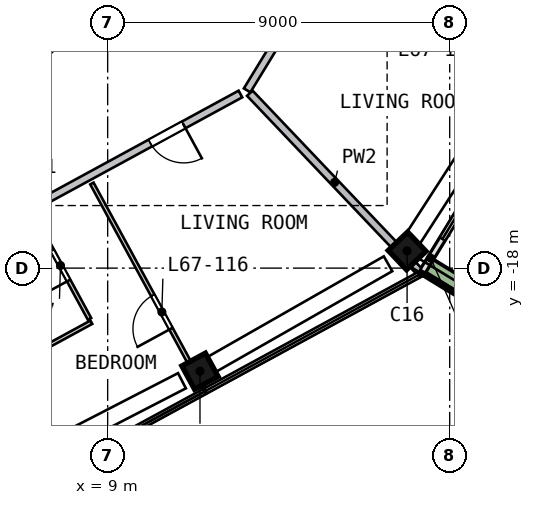
"""IFC4 building model, lengths in metres.
Left out: names, types, materials, properties, quantities, classifications, styles, units other than length and angle.
Written with IfcOpenShell. Run it as: python <this file> out.ifc"""

import sys

from ifc_helpers import new_model, si_unit, direction, frame, frame_2d, origin, origin_2d, place, context, subcontext, project, spatial, rectangle, extrude, element, fill, save


model = new_model("IFC4")
c1 = context("Model", 3, precision=1e-05, world=origin(), true_north=direction((0.0, 1.0)))
c2 = subcontext(c1, "Body", "Model", "MODEL_VIEW")
j1 = project(units=[si_unit("LENGTHUNIT", "METRE"), si_unit("PLANEANGLEUNIT", "RADIAN")], contexts=[c1])
p1 = place(None, origin())
s1 = spatial("IfcSite", under=j1, at=p1, CompositionType="ELEMENT")
p2 = place(p1, origin())
s2 = spatial("IfcBuilding", under=s1, at=p2, CompositionType="ELEMENT")
p3 = place(p2, frame((0.0, 0.0, 274.0)))
s3 = spatial("IfcBuildingStorey", under=s2, at=p3, CompositionType="ELEMENT", Elevation=274.0)
p4 = place(p3, frame((11.311, -20.78, 0.0), z_axis=(0.0984061, 0.054678505, 0.993643045), x_axis=(0.872632983, 0.475225292, -0.112572636)))
e1 = element("IfcColumn", 1, at=p4, inside=s3, PredefinedType="COLUMN", context=c2, shape_type="SweptSolid", body=[
    extrude(rectangle(XDim=0.7, YDim=0.7, at=origin_2d()), origin(), (0.0, 0.0, 1.0), 3.21),
])
p5 = place(p3, frame((16.779, -17.644, 0.0), z_axis=(0.083241987, 0.080429245, 0.993278364), x_axis=(-0.720153088, -0.684092384, 0.115746011)))
e2 = element("IfcColumn", 2, at=p5, inside=s3, PredefinedType="COLUMN", context=c2, shape_type="SweptSolid", body=[
    extrude(rectangle(XDim=0.7, YDim=0.7, at=origin_2d()), origin(), (0.0, 0.0, 1.0), 3.211),
])
p6 = place(p3, frame((5.64, -13.841, 0.0), z_axis=(0.0, 0.0, 1.0), x_axis=(0.707106781, 0.707106781, 0.0)))
e3 = element("IfcWall", 3, at=p6, inside=s3, PredefinedType="SHEAR", context=c2, shape_type="SweptSolid", body=[
    extrude(rectangle(XDim=11.598, YDim=0.45, at=frame_2d((5.799, 0.0))), origin(), (0.0, 0.0, 1.0), 3.5),
])
p7 = place(p6, frame((2.099, 0.0, 0.0)))
e4 = element("IfcOpeningElement", 4, at=p7, cuts=e3, PredefinedType="OPENING", context=c2, shape_type="SweptSolid", body=[
    extrude(rectangle(XDim=1.2, YDim=2.1, at=frame_2d((0.6, 1.05))), frame((0.0, 0.235, 0.0), z_axis=(0.0, -1.0, 0.0), x_axis=(1.0, 0.0, 0.0)), (0.0, 0.0, 1.0), 0.47),
])
p8 = place(p3, frame((17.295, -18.074, 0.0), z_axis=(0.0, 0.0, 1.0), x_axis=(0.521598655, 0.853190977, 0.0)))
e5 = element("IfcWall", 5, at=p8, inside=s3, PredefinedType="SOLIDWALL", context=c2, shape_type="SweptSolid", body=[
    extrude(rectangle(XDim=3.787, YDim=0.15, at=frame_2d((1.893, 0.0))), origin(), (0.0, 0.0, 1.0), 2.525),
])
p9 = place(p8, frame((0.987, 0.0, 0.0)))
e6 = element("IfcOpeningElement", 6, at=p9, cuts=e5, PredefinedType="OPENING", context=c2, shape_type="SweptSolid", body=[
    extrude(rectangle(XDim=2.4, YDim=2.4, at=frame_2d((1.2, 1.2))), frame((0.0, 0.085, 0.0), z_axis=(0.0, -1.0, 0.0), x_axis=(1.0, 0.0, 0.0)), (0.0, 0.0, 1.0), 0.17),
])
p10 = place(p3, frame((17.438, -17.986, 0.0), z_axis=(0.0, 0.0, 1.0), x_axis=(0.853200699, -0.521582752, 0.0)))
e7 = element("IfcWall", 7, at=p10, inside=s3, PredefinedType="SOLIDWALL", context=c2, shape_type="SweptSolid", body=[
    extrude(rectangle(XDim=3.199, YDim=0.5, at=frame_2d((1.599, 0.0))), origin(), (0.0, 0.0, 1.0), 0.7),
])
p11 = place(p3, frame((12.493, -13.418, 0.0), z_axis=(0.0, 0.0, 1.0), x_axis=(-0.878320972, -0.478071407, 0.0)))
e8 = element("IfcWall", 8, at=p11, inside=s3, PredefinedType="SOLIDWALL", context=c2, shape_type="SweptSolid", body=[
    extrude(rectangle(XDim=9.117, YDim=0.2, at=frame_2d((4.558, 0.0))), origin(), (0.0, 0.0, 1.0), 3.19),
])
p12 = place(p11, frame((1.7, 0.0, 0.0)))
e9 = element("IfcOpeningElement", 9, at=p12, cuts=e8, PredefinedType="OPENING", context=c2, shape_type="SweptSolid", body=[
    extrude(rectangle(XDim=1.0, YDim=2.1, at=frame_2d((0.5, 1.05))), frame((0.0, 0.11, 0.0), z_axis=(0.0, -1.0, 0.0), x_axis=(1.0, 0.0, 0.0)), (0.0, 0.0, 1.0), 0.22),
])
p13 = place(p3, frame((17.529, -5.374, 0.0), z_axis=(0.0, 0.0, 1.0), x_axis=(-0.521611117, -0.853183358, 0.0)))
e10 = element("IfcWall", 10, at=p13, inside=s3, PredefinedType="SOLIDWALL", context=c2, shape_type="SweptSolid", body=[
    extrude(rectangle(XDim=9.317, YDim=0.2, at=frame_2d((4.658, 0.0))), origin(), (0.0, 0.0, 1.0), 3.19),
])
p14 = place(p13, frame((6.458, 0.0, 0.0)))
e11 = element("IfcOpeningElement", 11, at=p14, cuts=e10, PredefinedType="OPENING", context=c2, shape_type="SweptSolid", body=[
    extrude(rectangle(XDim=1.0, YDim=2.1, at=frame_2d((0.5, 1.05))), frame((0.0, 0.11, 0.0), z_axis=(0.0, -1.0, 0.0), x_axis=(1.0, 0.0, 0.0)), (0.0, 0.0, 1.0), 0.22),
])
p15 = place(p3, frame((12.74, -13.398, 0.0), z_axis=(0.0, 0.0, 1.0), x_axis=(0.689126869, -0.72464071, 0.0)))
e12 = element("IfcWall", 12, at=p15, inside=s3, PredefinedType="SOLIDWALL", context=c2, shape_type="SweptSolid", body=[
    extrude(rectangle(XDim=6.476, YDim=0.2, at=frame_2d((3.238, 0.0))), origin(), (0.0, 0.0, 1.0), 3.19),
])
p16 = place(p3, frame((5.318, -21.195, 0.0), z_axis=(0.0, 0.0, 1.0), x_axis=(0.878330978, 0.478053023, 0.0)))
e13 = element("IfcWall", 13, at=p16, inside=s3, PredefinedType="PARTITIONING", context=c2, shape_type="SweptSolid", body=[
    extrude(rectangle(XDim=3.704, YDim=0.1, at=frame_2d((1.852, 0.0))), origin(), (0.0, 0.0, 1.0), 3.19),
])
p17 = place(p3, frame((8.523, -19.336, 0.0), z_axis=(0.0, 0.0, 1.0), x_axis=(-0.478129117, 0.878289558, 0.0)))
e14 = element("IfcWall", 14, at=p17, inside=s3, PredefinedType="PARTITIONING", context=c2, shape_type="SweptSolid", body=[
    extrude(rectangle(XDim=3.1, YDim=0.1, at=frame_2d((1.55, 0.0))), origin(), (0.0, 0.0, 1.0), 3.19),
])
p18 = place(p17, frame((1.15, 0.0, 0.0)))
e15 = element("IfcOpeningElement", 15, at=p18, cuts=e14, PredefinedType="OPENING", context=c2, shape_type="SweptSolid", body=[
    extrude(rectangle(XDim=0.9, YDim=2.1, at=frame_2d((0.45, 1.05))), frame((0.0, 0.06, 0.0), z_axis=(0.0, -1.0, 0.0), x_axis=(1.0, 0.0, 0.0)), (0.0, 0.0, 1.0), 0.12),
])
p19 = place(p3, frame((11.526, -21.175, 0.0), z_axis=(0.0, 0.0, 1.0), x_axis=(-0.478081504, 0.878315476, 0.0)))
e16 = element("IfcWall", 16, at=p19, inside=s3, PredefinedType="PARTITIONING", context=c2, shape_type="SweptSolid", body=[
    extrude(rectangle(XDim=6.15, YDim=0.1, at=frame_2d((3.075, 0.0))), origin(), (0.0, 0.0, 1.0), 3.19),
])
p20 = place(p19, frame((1.8, 0.0, 0.0)))
e17 = element("IfcOpeningElement", 17, at=p20, cuts=e16, PredefinedType="OPENING", context=c2, shape_type="SweptSolid", body=[
    extrude(rectangle(XDim=1.0, YDim=2.1, at=frame_2d((0.5, 1.05))), frame((0.0, 0.06, 0.0), z_axis=(0.0, -1.0, 0.0), x_axis=(1.0, 0.0, 0.0)), (0.0, 0.0, 1.0), 0.12),
])
p21 = place(p3, frame((15.322, -9.367, 0.0), z_axis=(0.0, 0.0, 1.0), x_axis=(0.853193504, -0.521594521, 0.0)))
e18 = element("IfcWall", 18, at=p21, inside=s3, PredefinedType="PARTITIONING", context=c2, shape_type="SweptSolid", body=[
    extrude(rectangle(XDim=6.15, YDim=0.1, at=frame_2d((3.075, 0.0))), origin(), (0.0, 0.0, 1.0), 3.19),
])
p22 = place(p21, frame((3.35, 0.0, 0.0)))
e19 = element("IfcOpeningElement", 19, at=p22, cuts=e18, PredefinedType="OPENING", context=c2, shape_type="SweptSolid", body=[
    extrude(rectangle(XDim=1.0, YDim=2.1, at=frame_2d((0.5, 1.05))), frame((0.0, 0.06, 0.0), z_axis=(0.0, -1.0, 0.0), x_axis=(1.0, 0.0, 0.0)), (0.0, 0.0, 1.0), 0.12),
])
p23 = place(p9, origin())
e20 = element("IfcDoor", 20, at=p23, inside=s3, OperationType="SLIDING_TO_LEFT", PredefinedType="DOOR", context=c2, shape_type="SweptSolid", body=[
    extrude(rectangle(XDim=2.4, YDim=2.4, at=frame_2d((1.2, 1.2))), frame((0.0, 0.025, 0.0), z_axis=(0.0, -1.0, 0.0), x_axis=(1.0, 0.0, 0.0)), (0.0, 0.0, 1.0), 0.05),
])
fill(e6, e20)
p24 = place(p7, origin())
e21 = element("IfcDoor", 21, at=p24, inside=s3, OperationType="SINGLE_SWING_LEFT", PredefinedType="DOOR", context=c2, shape_type="SweptSolid", body=[
    extrude(rectangle(XDim=1.2, YDim=2.1, at=frame_2d((0.6, 1.05))), frame((0.0, 0.025, 0.0), z_axis=(0.0, -1.0, 0.0), x_axis=(1.0, 0.0, 0.0)), (0.0, 0.0, 1.0), 0.05),
])
fill(e4, e21)
p25 = place(p12, origin())
e22 = element("IfcDoor", 22, at=p25, inside=s3, OperationType="SINGLE_SWING_LEFT", PredefinedType="DOOR", context=c2, shape_type="SweptSolid", body=[
    extrude(rectangle(XDim=1.0, YDim=2.1, at=frame_2d((0.5, 1.05))), frame((0.0, 0.025, 0.0), z_axis=(0.0, -1.0, 0.0), x_axis=(1.0, 0.0, 0.0)), (0.0, 0.0, 1.0), 0.05),
])
fill(e9, e22)
p26 = place(p20, origin())
e23 = element("IfcDoor", 23, at=p26, inside=s3, OperationType="SINGLE_SWING_LEFT", PredefinedType="DOOR", context=c2, shape_type="SweptSolid", body=[
    extrude(rectangle(XDim=1.0, YDim=2.1, at=frame_2d((0.5, 1.05))), frame((0.0, 0.025, 0.0), z_axis=(0.0, -1.0, 0.0), x_axis=(1.0, 0.0, 0.0)), (0.0, 0.0, 1.0), 0.05),
])
fill(e17, e23)
p27 = place(p18, origin())
e24 = element("IfcDoor", 24, at=p27, inside=s3, OperationType="SINGLE_SWING_LEFT", PredefinedType="DOOR", context=c2, shape_type="SweptSolid", body=[
    extrude(rectangle(XDim=0.9, YDim=2.1, at=frame_2d((0.45, 1.05))), frame((0.0, 0.025, 0.0), z_axis=(0.0, -1.0, 0.0), x_axis=(1.0, 0.0, 0.0)), (0.0, 0.0, 1.0), 0.05),
])
fill(e15, e24)
save(model, sys.argv[1])
